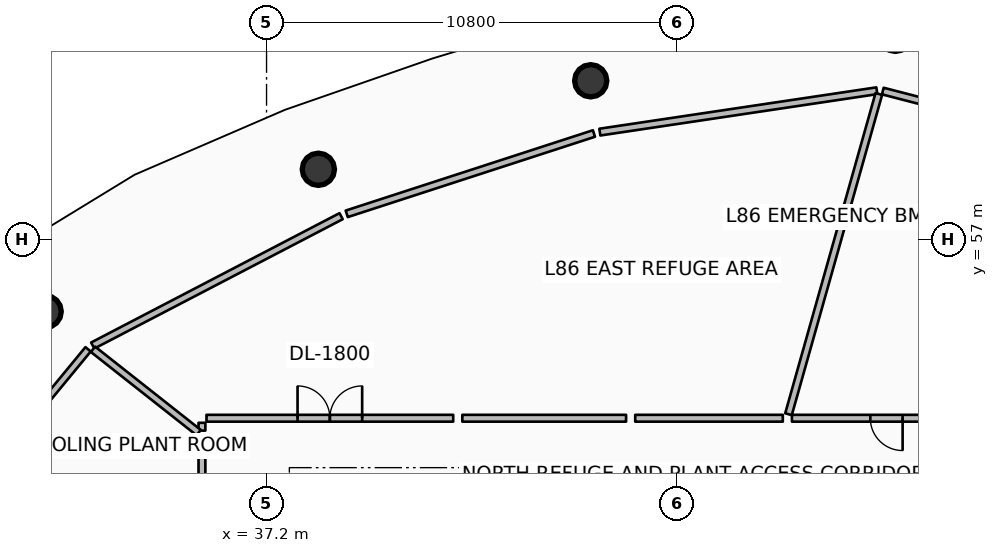
"""IFC4 building model, lengths in metres.
Left out: names, types, materials, properties, quantities, classifications, styles, units other than length and angle.
Written with IfcOpenShell. Run it as: python <this file> out.ifc"""

import sys

from ifc_helpers import new_model, si_unit, direction, frame, frame_2d, origin, origin_2d, place, context, subcontext, project, spatial, rectangle, circle, extrude, element, fill, save


model = new_model("IFC4")
c1 = context("Model", 3, precision=1e-05, world=origin(), true_north=direction((0.0, 1.0)))
c2 = subcontext(c1, "Body", "Model", "MODEL_VIEW")
j1 = project(units=[si_unit("LENGTHUNIT", "METRE"), si_unit("PLANEANGLEUNIT", "RADIAN")], contexts=[c1])
p1 = place(None, origin())
s1 = spatial("IfcSite", under=j1, at=p1, CompositionType="ELEMENT")
p2 = place(p1, origin())
s2 = spatial("IfcBuilding", under=s1, at=p2, CompositionType="ELEMENT")
p3 = place(p2, frame((0.0, 0.0, 343.1)))
s3 = spatial("IfcBuildingStorey", under=s2, at=p3, CompositionType="ELEMENT", Elevation=343.1)
for number, where, z_axis, x_axis in (
    (1, (45.73, 61.179, 0.0), (0.0, 0.0, 1.0), (1.0, 0.0, 0.0)),
    (2, (38.563, 58.851, 0.0), (0.0, 0.0, 1.0), (1.0, 0.0, 0.0)),
    (3, (31.374, 55.107, 0.0), (0.0, 0.0, 1.0), (1.0, 0.0, 0.0)),
):
    element("IfcColumn", number, at=place(p3, frame(where, z_axis=z_axis, x_axis=x_axis)), inside=s3, PredefinedType="COLUMN", context=c2, shape_type="SweptSolid", body=[
        extrude(circle(Radius=0.425, at=origin_2d()), origin(), (0.0, 0.0, 1.0), 3.94),
    ])
p4 = place(p3, frame((61.221, 58.889, 0.0), z_axis=(0.0, 0.0, 1.0), x_axis=(-0.96812020229, 0.250486075298, 0.0)))
e4 = element("IfcWall", 4, at=p4, inside=s3, PredefinedType="PARTITIONING", context=c2, shape_type="SweptSolid", body=[
    extrude(rectangle(XDim=8.062, YDim=0.18, at=frame_2d((4.031, 0.0))), origin(), (0.0, 0.0, 1.0), 2.933),
])
p5 = place(p3, frame((53.26, 60.917, 0.0), z_axis=(0.0, 0.0, 1.0), x_axis=(-0.989035992024, -0.147674664315, 0.0)))
e5 = element("IfcWall", 5, at=p5, inside=s3, PredefinedType="PARTITIONING", context=c2, shape_type="SweptSolid", body=[
    extrude(rectangle(XDim=7.37, YDim=0.18, at=frame_2d((3.685, 0.0))), origin(), (0.0, 0.0, 1.0), 2.933),
])
p6 = place(p3, frame((45.815, 59.792, 0.0), z_axis=(0.0, 0.0, 1.0), x_axis=(-0.95105793387, -0.309012631495, 0.0)))
e6 = element("IfcWall", 6, at=p6, inside=s3, PredefinedType="PARTITIONING", context=c2, shape_type="SweptSolid", body=[
    extrude(rectangle(XDim=6.84, YDim=0.18, at=frame_2d((3.42, 0.0))), origin(), (0.0, 0.0, 1.0), 2.933),
])
p7 = place(p3, frame((39.163, 57.617, 0.0), z_axis=(0.0, 0.0, 1.0), x_axis=(-0.886951970108, -0.461861670548, 0.0)))
e7 = element("IfcWall", 7, at=p7, inside=s3, PredefinedType="PARTITIONING", context=c2, shape_type="SweptSolid", body=[
    extrude(rectangle(XDim=7.37, YDim=0.18, at=frame_2d((3.685, 0.0))), origin(), (0.0, 0.0, 1.0), 2.933),
])
p8 = place(p3, frame((32.504, 54.114, 0.0), z_axis=(0.0, 0.0, 1.0), x_axis=(-0.635999094609, -0.771689802743, 0.0)))
e8 = element("IfcWall", 8, at=p8, inside=s3, PredefinedType="PARTITIONING", context=c2, shape_type="SweptSolid", body=[
    extrude(rectangle(XDim=8.062, YDim=0.18, at=frame_2d((4.031, 0.0))), origin(), (0.0, 0.0, 1.0), 2.933),
])
p9 = place(p3, frame((50.785, 52.3, 0.0), z_axis=(0.0, 0.0, 1.0), x_axis=(-1.0, 0.0, 0.0)))
e9 = element("IfcWall", 9, at=p9, inside=s3, PredefinedType="PARTITIONING", context=c2, shape_type="SweptSolid", body=[
    extrude(rectangle(XDim=3.884, YDim=0.18, at=frame_2d((1.942, 0.0))), origin(), (0.0, 0.0, 1.0), 2.933),
])
p10 = place(p3, frame((46.661, 52.3, 0.0), z_axis=(0.0, 0.0, 1.0), x_axis=(-1.0, 0.0, 0.0)))
e10 = element("IfcWall", 10, at=p10, inside=s3, PredefinedType="PARTITIONING", context=c2, shape_type="SweptSolid", body=[
    extrude(rectangle(XDim=4.309, YDim=0.18, at=frame_2d((2.155, 0.0))), origin(), (0.0, 0.0, 1.0), 2.933),
])
p11 = place(p3, frame((42.112, 52.3, 0.0), z_axis=(0.0, 0.0, 1.0), x_axis=(-1.0, 0.0, 0.0)))
e11 = element("IfcWall", 11, at=p11, inside=s3, PredefinedType="PARTITIONING", context=c2, shape_type="SweptSolid", body=[
    extrude(rectangle(XDim=6.492, YDim=0.18, at=frame_2d((3.246, 0.0))), origin(), (0.0, 0.0, 1.0), 2.933),
])
p12 = place(p11, frame((2.396, 0.0, 0.0)))
e12 = element("IfcOpeningElement", 12, at=p12, cuts=e11, PredefinedType="OPENING", context=c2, shape_type="SweptSolid", body=[
    extrude(rectangle(XDim=1.7, YDim=2.15, at=frame_2d((0.85, 1.075))), frame((0.0, 0.1, 0.0), z_axis=(0.0, -1.0, 0.0), x_axis=(1.0, 0.0, 0.0)), (0.0, 0.0, 1.0), 0.2),
])
p13 = place(p3, frame((35.5, 52.18, 0.0), z_axis=(0.0, 0.0, 1.0), x_axis=(0.0, -1.0, 0.0)))
e13 = element("IfcWall", 13, at=p13, inside=s3, PredefinedType="PARTITIONING", context=c2, shape_type="SweptSolid", body=[
    extrude(rectangle(XDim=0.206, YDim=0.18, at=frame_2d((0.103, 0.0))), origin(), (0.0, 0.0, 1.0), 2.933),
])
p14 = place(p3, frame((50.935, 52.406, 0.0), z_axis=(0.0, 0.0, 1.0), x_axis=(0.271427049977, 0.962459015512, 0.0)))
e14 = element("IfcWall", 14, at=p14, inside=s3, PredefinedType="PARTITIONING", context=c2, shape_type="SweptSolid", body=[
    extrude(rectangle(XDim=8.755, YDim=0.18, at=frame_2d((4.378, 0.0))), origin(), (0.0, 0.0, 1.0), 2.933),
])
p15 = place(p3, frame((35.414, 51.922, 0.0), z_axis=(0.0, 0.0, 1.0), x_axis=(-0.78533621982, 0.619069480622, 0.0)))
e15 = element("IfcWall", 15, at=p15, inside=s3, PredefinedType="PARTITIONING", context=c2, shape_type="SweptSolid", body=[
    extrude(rectangle(XDim=3.54, YDim=0.18, at=frame_2d((1.77, 0.0))), origin(), (0.0, 0.0, 1.0), 2.933),
])
p16 = place(p3, frame((35.5, 51.734, 0.0), z_axis=(0.0, 0.0, 1.0), x_axis=(0.0, -1.0, 0.0)))
e16 = element("IfcWall", 16, at=p16, inside=s3, PredefinedType="PARTITIONING", context=c2, shape_type="SweptSolid", body=[
    extrude(rectangle(XDim=6.089, YDim=0.18, at=frame_2d((3.044, 0.0))), origin(), (0.0, 0.0, 1.0), 2.933),
])
p17 = place(p16, frame((2.519, 0.0, 0.0)))
e17 = element("IfcOpeningElement", 17, at=p17, cuts=e16, PredefinedType="OPENING", context=c2, shape_type="SweptSolid", body=[
    extrude(rectangle(XDim=1.05, YDim=2.1, at=frame_2d((0.525, 1.05))), frame((0.0, 0.1, 0.0), z_axis=(0.0, -1.0, 0.0), x_axis=(1.0, 0.0, 0.0)), (0.0, 0.0, 1.0), 0.2),
])
p18 = place(p3, frame((56.0, 52.3, 0.0), z_axis=(0.0, 0.0, 1.0), x_axis=(-1.0, 0.0, 0.0)))
e18 = element("IfcWall", 18, at=p18, inside=s3, PredefinedType="PARTITIONING", context=c2, shape_type="SweptSolid", body=[
    extrude(rectangle(XDim=4.975, YDim=0.18, at=frame_2d((2.488, 0.0))), origin(), (0.0, 0.0, 1.0), 2.933),
])
p19 = place(p18, frame((2.062, 0.0, 0.0)))
e19 = element("IfcOpeningElement", 19, at=p19, cuts=e18, PredefinedType="OPENING", context=c2, shape_type="SweptSolid", body=[
    extrude(rectangle(XDim=0.85, YDim=2.06, at=frame_2d((0.425, 1.03))), frame((0.0, 0.1, 0.0), z_axis=(0.0, -1.0, 0.0), x_axis=(1.0, 0.0, 0.0)), (0.0, 0.0, 1.0), 0.2),
])
p20 = place(p12, origin())
e20 = element("IfcDoor", 20, at=p20, inside=s3, OperationType="DOUBLE_DOOR_SINGLE_SWING", PredefinedType="DOOR", context=c2, shape_type="SweptSolid", body=[
    extrude(rectangle(XDim=1.7, YDim=2.15, at=frame_2d((0.85, 1.075))), frame((0.0, 0.025, 0.0), z_axis=(0.0, -1.0, 0.0), x_axis=(1.0, 0.0, 0.0)), (0.0, 0.0, 1.0), 0.05),
])
fill(e12, e20)
p21 = place(p19, origin())
e21 = element("IfcDoor", 21, at=p21, inside=s3, OperationType="SINGLE_SWING_LEFT", PredefinedType="DOOR", context=c2, shape_type="SweptSolid", body=[
    extrude(rectangle(XDim=0.85, YDim=2.06, at=frame_2d((0.425, 1.03))), frame((0.0, 0.025, 0.0), z_axis=(0.0, -1.0, 0.0), x_axis=(1.0, 0.0, 0.0)), (0.0, 0.0, 1.0), 0.05),
])
fill(e19, e21)
save(model, sys.argv[1])
